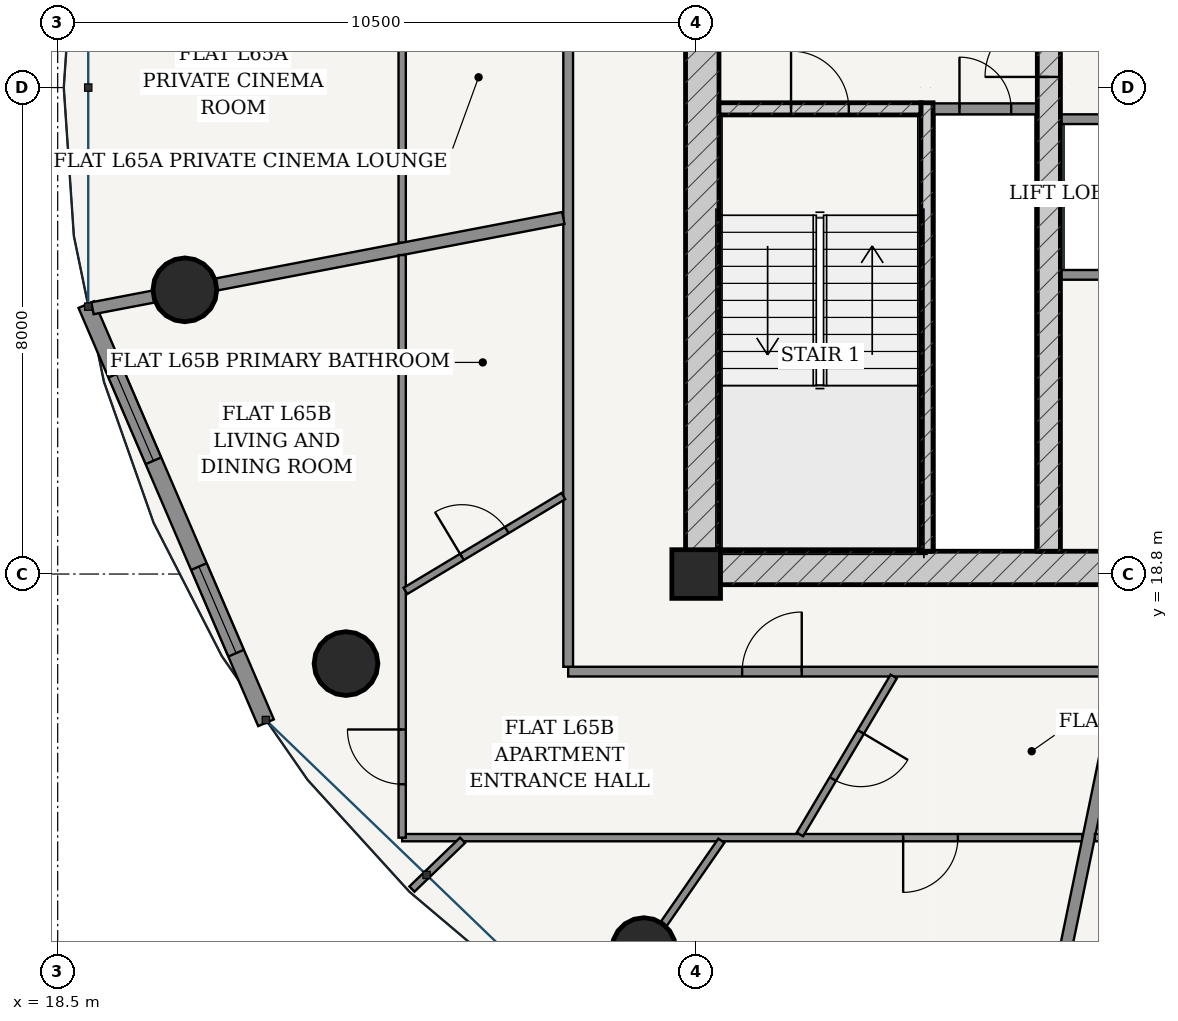
"""IFC4 building model, lengths in metres.
Left out: names, types, materials, properties, quantities, classifications, styles, units other than length and angle.
Written with IfcOpenShell. Run it as: python <this file> out.ifc"""

import sys

from ifc_helpers import new_model, si_unit, direction, frame, frame_2d, origin, origin_2d, place, context, subcontext, project, spatial, rectangle, hollow_circle, extrude, source, transform, mapped, element, fill, save


model = new_model("IFC4")
c1 = context("Model", 3, precision=1e-05, world=origin(), true_north=direction((-0.2419218956, 0.970295726276)))
c2 = subcontext(c1, "Body", "Model", "MODEL_VIEW")
j1 = project(units=[si_unit("LENGTHUNIT", "METRE"), si_unit("PLANEANGLEUNIT", "RADIAN")], contexts=[c1])
p1 = place(None, origin())
s1 = spatial("IfcSite", under=j1, at=p1, CompositionType="ELEMENT")
p2 = place(p1, origin())
s2 = spatial("IfcBuilding", under=s1, at=p2, CompositionType="ELEMENT")
p3 = place(p2, frame((0.0, 0.0, 248.2)))
s3 = spatial("IfcBuildingStorey", under=s2, at=p3, CompositionType="ELEMENT", Elevation=248.2)
p4 = place(p3, frame((29.0, 18.8, 0.0), z_axis=(0.0, 0.0, 1.0), x_axis=(1.0, 0.0, 0.0)))
e1 = element("IfcColumn", 1, at=p4, inside=s3, PredefinedType="COLUMN", context=c2, shape_type="SweptSolid", body=[
    extrude(rectangle(XDim=0.8, YDim=0.8, at=origin_2d()), origin(), (0.0, 0.0, 1.0), 3.75),
])
p5 = place(p3, frame((28.825, 18.9, 0.0), z_axis=(0.0, 0.0, 1.0), x_axis=(1.0, 0.0, 0.0)))
e2 = element("IfcWall", 2, at=p5, inside=s3, PredefinedType="SHEAR", context=c2, shape_type="SweptSolid", body=[
    extrude(rectangle(XDim=18.35, YDim=0.55, at=frame_2d((9.175, 0.0))), origin(), (0.0, 0.0, 1.0), 3.49),
])
p6 = place(p5, frame((7.41, 0.0, 0.0)))
e3 = element("IfcOpeningElement", 3, at=p6, cuts=e2, PredefinedType="OPENING", context=c2, shape_type="SweptSolid", body=[
    extrude(rectangle(XDim=0.85, YDim=2.1, at=frame_2d((0.425, 1.05))), frame((0.0, 0.285, 0.0), z_axis=(0.0, -1.0, 0.0), x_axis=(1.0, 0.0, 0.0)), (0.0, 0.0, 1.0), 0.57),
])
p7 = place(p5, frame((10.49, 0.0, 0.0)))
e4 = element("IfcOpeningElement", 4, at=p7, cuts=e2, PredefinedType="OPENING", context=c2, shape_type="SweptSolid", body=[
    extrude(rectangle(XDim=0.85, YDim=2.1, at=frame_2d((0.425, 1.05))), frame((0.0, 0.285, 0.0), z_axis=(0.0, -1.0, 0.0), x_axis=(1.0, 0.0, 0.0)), (0.0, 0.0, 1.0), 0.57),
])
p8 = place(p3, frame((29.1, 19.175, 0.0), z_axis=(0.0, 0.0, 1.0), x_axis=(0.0, 1.0, 0.0)))
e5 = element("IfcWall", 5, at=p8, inside=s3, PredefinedType="SHEAR", context=c2, shape_type="SweptSolid", body=[
    extrude(rectangle(XDim=15.25, YDim=0.55, at=frame_2d((7.625, 0.0))), origin(), (0.0, 0.0, 1.0), 3.49),
])
p9 = place(p8, frame((9.875, 0.0, 0.0)))
e6 = element("IfcOpeningElement", 6, at=p9, cuts=e5, PredefinedType="OPENING", context=c2, shape_type="SweptSolid", body=[
    extrude(rectangle(XDim=1.5, YDim=2.2, at=frame_2d((0.75, 1.1))), frame((0.0, 0.285, 0.0), z_axis=(0.0, -1.0, 0.0), x_axis=(1.0, 0.0, 0.0)), (0.0, 0.0, 1.0), 0.57),
])
p10 = place(p3, frame((32.795, 19.175, 0.0), z_axis=(0.0, 0.0, 1.0), x_axis=(0.0, 1.0, 0.0)))
e7 = element("IfcWall", 7, at=p10, inside=s3, PredefinedType="SOLIDWALL", context=c2, shape_type="SweptSolid", body=[
    extrude(rectangle(XDim=7.375, YDim=0.2, at=frame_2d((3.688, 0.0))), origin(), (0.0, 0.0, 1.0), 3.49),
])
p11 = place(p3, frame((29.375, 26.45, 0.0), z_axis=(0.0, 0.0, 1.0), x_axis=(1.0, 0.0, 0.0)))
e8 = element("IfcWall", 8, at=p11, inside=s3, PredefinedType="SOLIDWALL", context=c2, shape_type="SweptSolid", body=[
    extrude(rectangle(XDim=3.32, YDim=0.2, at=frame_2d((1.66, 0.0))), origin(), (0.0, 0.0, 1.0), 3.49),
])
p12 = place(p11, frame((1.185, 0.0, 0.0)))
e9 = element("IfcOpeningElement", 9, at=p12, cuts=e8, PredefinedType="OPENING", context=c2, shape_type="SweptSolid", body=[
    extrude(rectangle(XDim=0.95, YDim=2.15, at=frame_2d((0.475, 1.075))), frame((0.0, 0.11, 0.0), z_axis=(0.0, -1.0, 0.0), x_axis=(1.0, 0.0, 0.0)), (0.0, 0.0, 1.0), 0.22),
])
p13 = place(p3, frame((34.8, 19.175, 0.0), z_axis=(0.0, 0.0, 1.0), x_axis=(0.0, 1.0, 0.0)))
e10 = element("IfcWall", 10, at=p13, inside=s3, PredefinedType="SHEAR", context=c2, shape_type="SweptSolid", body=[
    extrude(rectangle(XDim=15.25, YDim=0.38, at=frame_2d((7.625, 0.0))), origin(), (0.0, 0.0, 1.0), 3.49),
])
p14 = place(p13, frame((7.8, 0.0, 0.0)))
e11 = element("IfcOpeningElement", 11, at=p14, cuts=e10, PredefinedType="OPENING", context=c2, shape_type="SweptSolid", body=[
    extrude(rectangle(XDim=1.05, YDim=2.15, at=frame_2d((0.525, 1.075))), frame((0.0, 0.2, 0.0), z_axis=(0.0, -1.0, 0.0), x_axis=(1.0, 0.0, 0.0)), (0.0, 0.0, 1.0), 0.4),
])
for number, where, z_axis, x_axis in (
    (12, (20.591, 23.474, 0.0), (0.0, 0.0, 1.0), (1.0, 0.0, 0.0)),
    (13, (23.241, 17.328, 0.0), (0.0, 0.0, 1.0), (1.0, 0.0, 0.0)),
    (14, (28.139, 12.624, 0.0), (0.0, 0.0, 1.0), (1.0, 0.0, 0.0)),
):
    element("IfcColumn", number, at=place(p3, frame(where, z_axis=z_axis, x_axis=x_axis)), inside=s3, PredefinedType="COLUMN", context=c2, shape_type="SweptSolid", body=[
        extrude(hollow_circle(Radius=0.525, WallThickness=0.035, at=origin_2d()), origin(), (0.0, 0.0, 1.0), 3.75),
    ])
p15 = place(p3, frame((18.971, 23.231, 0.0), z_axis=(0.0, 0.0, 1.0), x_axis=(0.394816612978, -0.918759948037, 0.0)))
e15 = element("IfcWall", 15, at=p15, inside=s3, PredefinedType="SOLIDWALL", context=c2, shape_type="SweptSolid", body=[
    extrude(rectangle(XDim=7.485, YDim=0.28, at=frame_2d((3.743, 0.0))), origin(), (0.0, 0.0, 1.0), 3.49),
])
p16 = place(p15, frame((1.246, 0.0, 0.85)))
e16 = element("IfcOpeningElement", 16, at=p16, cuts=e15, PredefinedType="OPENING", context=c2, shape_type="SweptSolid", body=[
    extrude(rectangle(XDim=1.55, YDim=1.95, at=frame_2d((0.775, 0.975))), frame((0.0, 0.15, 0.0), z_axis=(0.0, -1.0, 0.0), x_axis=(1.0, 0.0, 0.0)), (0.0, 0.0, 1.0), 0.3),
])
p17 = place(p15, frame((4.689, 0.0, 0.85)))
e17 = element("IfcOpeningElement", 17, at=p17, cuts=e15, PredefinedType="OPENING", context=c2, shape_type="SweptSolid", body=[
    extrude(rectangle(XDim=1.55, YDim=1.95, at=frame_2d((0.775, 0.975))), frame((0.0, 0.15, 0.0), z_axis=(0.0, -1.0, 0.0), x_axis=(1.0, 0.0, 0.0)), (0.0, 0.0, 1.0), 0.3),
])
p18 = place(p3, frame((32.9, 26.45, 0.0), z_axis=(0.0, 0.0, 1.0), x_axis=(1.0, 0.0, 0.0)))
e18 = element("IfcWall", 18, at=p18, inside=s3, PredefinedType="PARTITIONING", context=c2, shape_type="SweptSolid", body=[
    extrude(rectangle(XDim=1.71, YDim=0.18, at=frame_2d((0.855, 0.0))), origin(), (0.0, 0.0, 1.0), 3.49),
])
p19 = place(p18, frame((0.43, 0.0, 0.0)))
e19 = element("IfcOpeningElement", 19, at=p19, cuts=e18, PredefinedType="OPENING", context=c2, shape_type="SweptSolid", body=[
    extrude(rectangle(XDim=0.85, YDim=2.1, at=frame_2d((0.425, 1.05))), frame((0.0, 0.1, 0.0), z_axis=(0.0, -1.0, 0.0), x_axis=(1.0, 0.0, 0.0)), (0.0, 0.0, 1.0), 0.2),
])
p20 = place(p3, frame((34.99, 26.28, 0.0), z_axis=(0.0, 0.0, 1.0), x_axis=(1.0, 0.0, 0.0)))
e20 = element("IfcWall", 20, at=p20, inside=s3, PredefinedType="PARTITIONING", context=c2, shape_type="SweptSolid", body=[
    extrude(rectangle(XDim=6.02, YDim=0.16, at=frame_2d((3.01, 0.0))), origin(), (0.0, 0.0, 1.0), 3.49),
])
p21 = place(p20, frame((3.215, 0.0, 0.0)))
e21 = element("IfcOpeningElement", 21, at=p21, cuts=e20, PredefinedType="OPENING", context=c2, shape_type="SweptSolid", body=[
    extrude(rectangle(XDim=1.1, YDim=2.2, at=frame_2d((0.55, 1.1))), frame((0.0, 0.09, 0.0), z_axis=(0.0, -1.0, 0.0), x_axis=(1.0, 0.0, 0.0)), (0.0, 0.0, 1.0), 0.18),
])
p22 = place(p20, frame((4.695, 0.0, 0.0)))
e22 = element("IfcOpeningElement", 22, at=p22, cuts=e20, PredefinedType="OPENING", context=c2, shape_type="SweptSolid", body=[
    extrude(rectangle(XDim=1.1, YDim=2.2, at=frame_2d((0.55, 1.1))), frame((0.0, 0.09, 0.0), z_axis=(0.0, -1.0, 0.0), x_axis=(1.0, 0.0, 0.0)), (0.0, 0.0, 1.0), 0.18),
])
p23 = place(p3, frame((34.99, 23.72, 0.0), z_axis=(0.0, 0.0, 1.0), x_axis=(1.0, 0.0, 0.0)))
e23 = element("IfcWall", 23, at=p23, inside=s3, PredefinedType="PARTITIONING", context=c2, shape_type="SweptSolid", body=[
    extrude(rectangle(XDim=6.02, YDim=0.16, at=frame_2d((3.01, 0.0))), origin(), (0.0, 0.0, 1.0), 3.49),
])
p24 = place(p3, frame((26.895, 17.195, 0.0), z_axis=(0.0, 0.0, 1.0), x_axis=(1.0, 0.0, 0.0)))
e24 = element("IfcWall", 24, at=p24, inside=s3, PredefinedType="PARTITIONING", context=c2, shape_type="SweptSolid", body=[
    extrude(rectangle(XDim=22.21, YDim=0.16, at=frame_2d((11.105, 0.0))), origin(), (0.0, 0.0, 1.0), 3.015),
])
p25 = place(p24, frame((2.861, 0.0, 0.0)))
e25 = element("IfcOpeningElement", 25, at=p25, cuts=e24, PredefinedType="OPENING", context=c2, shape_type="SweptSolid", body=[
    extrude(rectangle(XDim=0.98, YDim=2.2, at=frame_2d((0.49, 1.1))), frame((0.0, 0.09, 0.0), z_axis=(0.0, -1.0, 0.0), x_axis=(1.0, 0.0, 0.0)), (0.0, 0.0, 1.0), 0.18),
])
p26 = place(p24, frame((16.97, 0.0, 0.0)))
e26 = element("IfcOpeningElement", 26, at=p26, cuts=e24, PredefinedType="OPENING", context=c2, shape_type="SweptSolid", body=[
    extrude(rectangle(XDim=0.98, YDim=2.2, at=frame_2d((0.49, 1.1))), frame((0.0, 0.09, 0.0), z_axis=(0.0, -1.0, 0.0), x_axis=(1.0, 0.0, 0.0)), (0.0, 0.0, 1.0), 0.18),
])
p27 = place(p3, frame((26.895, 17.275, 0.0), z_axis=(0.0, 0.0, 1.0), x_axis=(0.0, 1.0, 0.0)))
e27 = element("IfcWall", 27, at=p27, inside=s3, PredefinedType="PARTITIONING", context=c2, shape_type="SweptSolid", body=[
    extrude(rectangle(XDim=13.925, YDim=0.16, at=frame_2d((6.962, 0.0))), origin(), (0.0, 0.0, 1.0), 3.015),
])
p28 = place(p3, frame((24.165, 24.249, 0.0), z_axis=(0.0, 0.0, 1.0), x_axis=(0.0, 1.0, 0.0)))
e28 = element("IfcWall", 28, at=p28, inside=s3, PredefinedType="PARTITIONING", context=c2, shape_type="SweptSolid", body=[
    extrude(rectangle(XDim=9.761, YDim=0.12, at=frame_2d((4.88, 0.0))), origin(), (0.0, 0.0, 1.0), 3.015),
])
p29 = place(p28, frame((4.43, 0.0, 0.0)))
e29 = element("IfcOpeningElement", 29, at=p29, cuts=e28, PredefinedType="OPENING", context=c2, shape_type="SweptSolid", body=[
    extrude(rectangle(XDim=0.9, YDim=2.15, at=frame_2d((0.45, 1.075))), frame((0.0, 0.07, 0.0), z_axis=(0.0, -1.0, 0.0), x_axis=(1.0, 0.0, 0.0)), (0.0, 0.0, 1.0), 0.14),
])
p30 = place(p3, frame((26.815, 24.656, 0.0), z_axis=(0.0, 0.0, 1.0), x_axis=(-0.982109889803, -0.188308694305, 0.0)))
e30 = element("IfcWall", 30, at=p30, inside=s3, PredefinedType="PARTITIONING", context=c2, shape_type="SweptSolid", body=[
    extrude(rectangle(XDim=7.884, YDim=0.2, at=frame_2d((3.942, 0.0))), origin(), (0.0, 0.0, 1.0), 3.015),
])
p31 = place(p3, frame((35.353, 14.465, 0.0), z_axis=(0.0, 0.0, 1.0), x_axis=(-1.0, 0.0, 0.0)))
e31 = element("IfcWall", 31, at=p31, inside=s3, PredefinedType="PARTITIONING", context=c2, shape_type="SweptSolid", body=[
    extrude(rectangle(XDim=11.188, YDim=0.12, at=frame_2d((5.594, 0.0))), origin(), (0.0, 0.0, 1.0), 3.015),
])
p32 = place(p31, frame((2.049, 0.0, 0.0)))
e32 = element("IfcOpeningElement", 32, at=p32, cuts=e31, PredefinedType="OPENING", context=c2, shape_type="SweptSolid", body=[
    extrude(rectangle(XDim=0.9, YDim=2.15, at=frame_2d((0.45, 1.075))), frame((0.0, 0.07, 0.0), z_axis=(0.0, -1.0, 0.0), x_axis=(1.0, 0.0, 0.0)), (0.0, 0.0, 1.0), 0.14),
])
p33 = place(p3, frame((24.165, 14.465, 0.0), z_axis=(0.0, 0.0, 1.0), x_axis=(0.0, 1.0, 0.0)))
e33 = element("IfcWall", 33, at=p33, inside=s3, PredefinedType="PARTITIONING", context=c2, shape_type="SweptSolid", body=[
    extrude(rectangle(XDim=9.58, YDim=0.12, at=frame_2d((4.79, 0.0))), origin(), (0.0, 0.0, 1.0), 3.015),
])
p34 = place(p33, frame((0.879, 0.0, 0.0)))
e34 = element("IfcOpeningElement", 34, at=p34, cuts=e33, PredefinedType="OPENING", context=c2, shape_type="SweptSolid", body=[
    extrude(rectangle(XDim=0.9, YDim=2.15, at=frame_2d((0.45, 1.075))), frame((0.0, 0.07, 0.0), z_axis=(0.0, -1.0, 0.0), x_axis=(1.0, 0.0, 0.0)), (0.0, 0.0, 1.0), 0.14),
])
p35 = place(p3, frame((25.159, 14.422, 0.0), z_axis=(0.0, 0.0, 1.0), x_axis=(-0.720070222664, -0.693901199331, 0.0)))
e35 = element("IfcWall", 35, at=p35, inside=s3, PredefinedType="PARTITIONING", context=c2, shape_type="SweptSolid", body=[
    extrude(rectangle(XDim=1.157, YDim=0.12, at=frame_2d((0.578, 0.0))), origin(), (0.0, 0.0, 1.0), 3.49),
])
p36 = place(p3, frame((29.414, 14.414, 0.0), z_axis=(0.0, 0.0, 1.0), x_axis=(-0.569657021681, -0.821882520589, 0.0)))
e36 = element("IfcWall", 36, at=p36, inside=s3, PredefinedType="PARTITIONING", context=c2, shape_type="SweptSolid", body=[
    extrude(rectangle(XDim=3.748, YDim=0.12, at=frame_2d((1.874, 0.0))), origin(), (0.0, 0.0, 1.0), 3.015),
])
p37 = place(p3, frame((26.815, 20.082, 0.0), z_axis=(0.0, 0.0, 1.0), x_axis=(-0.857265264382, -0.514875000834, 0.0)))
e37 = element("IfcWall", 37, at=p37, inside=s3, PredefinedType="PARTITIONING", context=c2, shape_type="SweptSolid", body=[
    extrude(rectangle(XDim=3.029, YDim=0.12, at=frame_2d((1.515, 0.0))), origin(), (0.0, 0.0, 1.0), 3.209),
])
p38 = place(p37, frame((1.085, 0.0, 0.0)))
e38 = element("IfcOpeningElement", 38, at=p38, cuts=e37, PredefinedType="OPENING", context=c2, shape_type="SweptSolid", body=[
    extrude(rectangle(XDim=0.86, YDim=2.15, at=frame_2d((0.43, 1.075))), frame((0.0, 0.07, 0.0), z_axis=(0.0, -1.0, 0.0), x_axis=(1.0, 0.0, 0.0)), (0.0, 0.0, 1.0), 0.14),
])
p39 = place(p3, frame((32.248, 17.115, 0.0), z_axis=(0.0, 0.0, 1.0), x_axis=(-0.510591051721, -0.85982369001, 0.0)))
e39 = element("IfcWall", 39, at=p39, inside=s3, PredefinedType="PARTITIONING", context=c2, shape_type="SweptSolid", body=[
    extrude(rectangle(XDim=3.02, YDim=0.12, at=frame_2d((1.51, 0.0))), origin(), (0.0, 0.0, 1.0), 3.209),
])
p40 = place(p39, frame((1.06, 0.0, 0.0)))
e40 = element("IfcOpeningElement", 40, at=p40, cuts=e39, PredefinedType="OPENING", context=c2, shape_type="SweptSolid", body=[
    extrude(rectangle(XDim=0.9, YDim=2.15, at=frame_2d((0.45, 1.075))), frame((0.0, 0.07, 0.0), z_axis=(0.0, -1.0, 0.0), x_axis=(1.0, 0.0, 0.0)), (0.0, 0.0, 1.0), 0.14),
])
p41 = place(p3, frame((36.001, 17.115, 0.0), z_axis=(0.0, 0.0, 1.0), x_axis=(-0.202108543081, -0.979363128167, 0.0)))
e41 = element("IfcWall", 41, at=p41, inside=s3, PredefinedType="PARTITIONING", context=c2, shape_type="SweptSolid", body=[
    extrude(rectangle(XDim=8.739, YDim=0.2, at=frame_2d((4.369, 0.0))), origin(), (0.0, 0.0, 1.0), 3.015),
])
p42 = place(p3, frame((51.835, 14.465, 0.0), z_axis=(0.0, 0.0, 1.0), x_axis=(-1.0, 0.0, 0.0)))
e42 = element("IfcWall", 42, at=p42, inside=s3, PredefinedType="PARTITIONING", context=c2, shape_type="SweptSolid", body=[
    extrude(rectangle(XDim=16.278, YDim=0.12, at=frame_2d((8.139, 0.0))), origin(), (0.0, 0.0, 1.0), 3.015),
])
p43 = place(p42, frame((7.665, 0.0, 0.0)))
e43 = element("IfcOpeningElement", 43, at=p43, cuts=e42, PredefinedType="OPENING", context=c2, shape_type="SweptSolid", body=[
    extrude(rectangle(XDim=0.9, YDim=2.15, at=frame_2d((0.45, 1.075))), frame((0.0, 0.07, 0.0), z_axis=(0.0, -1.0, 0.0), x_axis=(1.0, 0.0, 0.0)), (0.0, 0.0, 1.0), 0.14),
])
m1 = source(origin(), c2, "Body", "SweptSolid", [
    extrude(rectangle(XDim=1.55, YDim=1.95, at=frame_2d((0.775, 0.975))), frame((0.0, 0.03, 0.0), z_axis=(0.0, -1.0, 0.0), x_axis=(1.0, 0.0, 0.0)), (0.0, 0.0, 1.0), 0.06),
])
p44 = place(p16, origin())
e44 = element("IfcWindow", 44, at=p44, inside=s3, PartitioningType="SINGLE_PANEL", PredefinedType="WINDOW", context=c2, shape_type="MappedRepresentation", body=[
    mapped(m1, transform((0.0, 0.0, 0.0), scale=1.0)),
])
fill(e16, e44)
p45 = place(p17, origin())
e45 = element("IfcWindow", 45, at=p45, inside=s3, PartitioningType="SINGLE_PANEL", PredefinedType="WINDOW", context=c2, shape_type="MappedRepresentation", body=[
    mapped(m1, transform((0.0, 0.0, 0.0), scale=1.0)),
])
fill(e17, e45)
m2 = source(origin(), c2, "Body", "SweptSolid", [
    extrude(rectangle(XDim=1.05, YDim=2.15, at=frame_2d((0.525, 1.075))), frame((0.0, 0.025, 0.0), z_axis=(0.0, -1.0, 0.0), x_axis=(1.0, 0.0, 0.0)), (0.0, 0.0, 1.0), 0.05),
])
p46 = place(p14, origin())
e46 = element("IfcDoor", 46, at=p46, inside=s3, OperationType="SINGLE_SWING_LEFT", PredefinedType="DOOR", context=c2, shape_type="MappedRepresentation", body=[
    mapped(m2, transform((0.0, 0.0, 0.0), scale=1.0)),
])
fill(e11, e46)
m3 = source(origin(), c2, "Body", "SweptSolid", [
    extrude(rectangle(XDim=0.95, YDim=2.15, at=frame_2d((0.475, 1.075))), frame((0.0, 0.025, 0.0), z_axis=(0.0, -1.0, 0.0), x_axis=(1.0, 0.0, 0.0)), (0.0, 0.0, 1.0), 0.05),
])
p47 = place(p12, origin())
e47 = element("IfcDoor", 47, at=p47, inside=s3, OperationType="SINGLE_SWING_LEFT", PredefinedType="DOOR", context=c2, shape_type="MappedRepresentation", body=[
    mapped(m3, transform((0.0, 0.0, 0.0), scale=1.0)),
])
fill(e9, e47)
m4 = source(origin(), c2, "Body", "SweptSolid", [
    extrude(rectangle(XDim=0.85, YDim=2.1, at=frame_2d((0.425, 1.05))), frame((0.0, 0.025, 0.0), z_axis=(0.0, -1.0, 0.0), x_axis=(1.0, 0.0, 0.0)), (0.0, 0.0, 1.0), 0.05),
])
p48 = place(p19, origin())
e48 = element("IfcDoor", 48, at=p48, inside=s3, OperationType="SINGLE_SWING_LEFT", PredefinedType="DOOR", context=c2, shape_type="MappedRepresentation", body=[
    mapped(m4, transform((0.0, 0.0, 0.0), scale=1.0)),
])
fill(e19, e48)
m5 = source(origin(), c2, "Body", "SweptSolid", [
    extrude(rectangle(XDim=0.98, YDim=2.2, at=frame_2d((0.49, 1.1))), frame((0.0, 0.025, 0.0), z_axis=(0.0, -1.0, 0.0), x_axis=(1.0, 0.0, 0.0)), (0.0, 0.0, 1.0), 0.05),
])
p49 = place(p25, origin())
e49 = element("IfcDoor", 49, at=p49, inside=s3, OperationType="SINGLE_SWING_RIGHT", PredefinedType="DOOR", context=c2, shape_type="MappedRepresentation", body=[
    mapped(m5, transform((0.0, 0.0, 0.0), scale=1.0)),
])
fill(e25, e49)
m6 = source(origin(), c2, "Body", "SweptSolid", [
    extrude(rectangle(XDim=0.86, YDim=2.15, at=frame_2d((0.43, 1.075))), frame((0.0, 0.025, 0.0), z_axis=(0.0, -1.0, 0.0), x_axis=(1.0, 0.0, 0.0)), (0.0, 0.0, 1.0), 0.05),
])
p50 = place(p38, frame((0.86, 0.0, 0.0), z_axis=(0.0, 0.0, 1.0), x_axis=(-1.0, 0.0, 0.0)))
e50 = element("IfcDoor", 50, at=p50, inside=s3, OperationType="SINGLE_SWING_LEFT", PredefinedType="DOOR", context=c2, shape_type="MappedRepresentation", body=[
    mapped(m6, transform((0.0, 0.0, 0.0), scale=1.0)),
])
fill(e38, e50)
m7 = source(origin(), c2, "Body", "SweptSolid", [
    extrude(rectangle(XDim=0.9, YDim=2.15, at=frame_2d((0.45, 1.075))), frame((0.0, 0.025, 0.0), z_axis=(0.0, -1.0, 0.0), x_axis=(1.0, 0.0, 0.0)), (0.0, 0.0, 1.0), 0.05),
])
p51 = place(p34, origin())
e51 = element("IfcDoor", 51, at=p51, inside=s3, OperationType="SINGLE_SWING_RIGHT", PredefinedType="DOOR", context=c2, shape_type="MappedRepresentation", body=[
    mapped(m7, transform((0.0, 0.0, 0.0), scale=1.0)),
])
fill(e34, e51)
p52 = place(p40, origin())
e52 = element("IfcDoor", 52, at=p52, inside=s3, OperationType="SINGLE_SWING_LEFT", PredefinedType="DOOR", context=c2, shape_type="MappedRepresentation", body=[
    mapped(m7, transform((0.0, 0.0, 0.0), scale=1.0)),
])
fill(e40, e52)
p53 = place(p32, origin())
e53 = element("IfcDoor", 53, at=p53, inside=s3, OperationType="SINGLE_SWING_RIGHT", PredefinedType="DOOR", context=c2, shape_type="MappedRepresentation", body=[
    mapped(m7, transform((0.0, 0.0, 0.0), scale=1.0)),
])
fill(e32, e53)
save(model, sys.argv[1])
